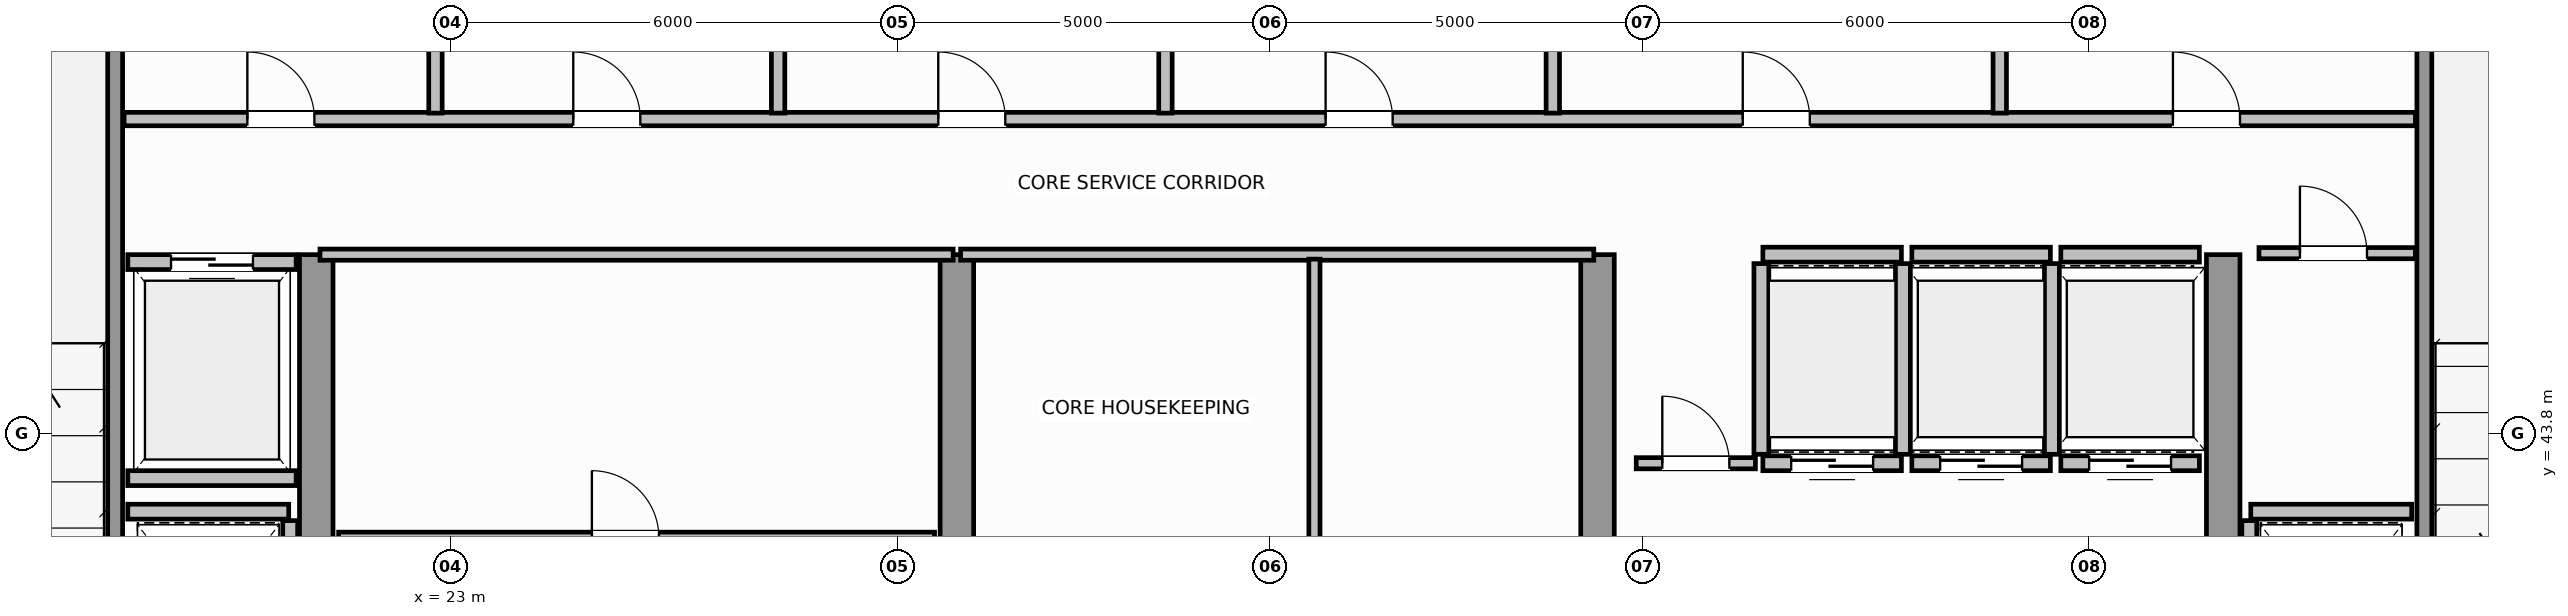
"""IFC4 building model, lengths in metres.
Left out: names, types, materials, properties, quantities, classifications, styles, units other than length and angle.
Written with IfcOpenShell. Run it as: python <this file> out.ifc"""

import sys

from ifc_helpers import new_model, si_unit, direction, frame, frame_2d, origin, place, context, subcontext, project, spatial, rectangle, extrude, source, transform, mapped, element, fill, save


model = new_model("IFC4")
c1 = context("Model", 3, precision=1e-05, world=origin(), true_north=direction((0.0, 1.0)))
c2 = subcontext(c1, "Body", "Model", "MODEL_VIEW")
j1 = project(units=[si_unit("LENGTHUNIT", "METRE"), si_unit("PLANEANGLEUNIT", "RADIAN")], contexts=[c1])
p1 = place(None, origin())
s1 = spatial("IfcSite", under=j1, at=p1, CompositionType="ELEMENT")
p2 = place(p1, origin())
s2 = spatial("IfcBuilding", under=s1, at=p2, CompositionType="ELEMENT")
p3 = place(p2, frame((0.0, 0.0, 280.2)))
s3 = spatial("IfcBuildingStorey", under=s2, at=p3, CompositionType="ELEMENT", Elevation=280.2)
for number, where, z_axis, x_axis in (
    (1, (21.2, 36.745, 0.0), (0.0, 0.0, 1.0), (0.0, 1.0, 0.0)),
    (2, (29.8, 36.745, 0.0), (0.0, 0.0, 1.0), (0.0, 1.0, 0.0)),
    (3, (38.4, 36.745, 0.0), (0.0, 0.0, 1.0), (0.0, 1.0, 0.0)),
    (4, (46.8, 36.745, 0.0), (0.0, 0.0, 1.0), (0.0, 1.0, 0.0)),
):
    element("IfcWall", number, at=place(p3, frame(where, z_axis=z_axis, x_axis=x_axis)), inside=s3, PredefinedType="SHEAR", context=c2, shape_type="SweptSolid", body=[
        extrude(rectangle(XDim=9.455, YDim=0.45, at=frame_2d((4.728, 0.0))), origin(), (0.0, 0.0, 1.0), 3.8),
    ])
for number, where, z_axis, x_axis in (
    (5, (18.5, 39.96, 0.0), (0.0, 0.0, 1.0), (0.0, 1.0, 0.0)),
    (6, (49.5, 39.96, 0.0), (0.0, 0.0, 1.0), (0.0, 1.0, 0.0)),
):
    element("IfcWall", number, at=place(p3, frame(where, z_axis=z_axis, x_axis=x_axis)), inside=s3, PredefinedType="SOLIDWALL", context=c2, shape_type="SweptSolid", body=[
        extrude(rectangle(XDim=9.93, YDim=0.2, at=frame_2d((4.965, 0.0))), origin(), (0.0, 0.0, 1.0), 3.8),
    ])
p4 = place(p3, frame((40.62, 43.4, 0.0), z_axis=(0.0, 0.0, 1.0), x_axis=(1.0, 0.0, 0.0)))
e7 = element("IfcWall", 7, at=p4, inside=s3, PredefinedType="SOLIDWALL", context=c2, shape_type="SweptSolid", body=[
    extrude(rectangle(XDim=1.86, YDim=0.2, at=frame_2d((0.93, 0.0))), origin(), (0.0, 0.0, 1.0), 3.58),
])
p5 = place(p4, frame((0.38, 0.0, 0.0)))
e8 = element("IfcOpeningElement", 8, at=p5, cuts=e7, PredefinedType="OPENING", context=c2, shape_type="SweptSolid", body=[
    extrude(rectangle(XDim=1.1, YDim=2.15, at=frame_2d((0.55, 1.075))), frame((0.0, 0.11, 0.0), z_axis=(0.0, -1.0, 0.0), x_axis=(1.0, 0.0, 0.0)), (0.0, 0.0, 1.0), 0.22),
])
p6 = place(p3, frame((40.62, 46.2, 0.0), z_axis=(0.0, 0.0, 1.0), x_axis=(1.0, 0.0, 0.0)))
e9 = element("IfcWall", 9, at=p6, inside=s3, PredefinedType="SOLIDWALL", context=c2, shape_type="SweptSolid", body=[
    extrude(rectangle(XDim=1.86, YDim=0.2, at=frame_2d((0.93, 0.0))), origin(), (0.0, 0.0, 1.0), 3.58),
])
for number, where, z_axis, x_axis in (
    (10, (40.6, 43.52, 0.0), (0.0, 0.0, 1.0), (0.0, 1.0, 0.0)),
    (11, (42.5, 43.52, 0.0), (0.0, 0.0, 1.0), (0.0, 1.0, 0.0)),
):
    element("IfcWall", number, at=place(p3, frame(where, z_axis=z_axis, x_axis=x_axis)), inside=s3, PredefinedType="SOLIDWALL", context=c2, shape_type="SweptSolid", body=[
        extrude(rectangle(XDim=2.56, YDim=0.2, at=frame_2d((1.28, 0.0))), origin(), (0.0, 0.0, 1.0), 3.58),
    ])
p7 = place(p3, frame((42.62, 43.4, 0.0), z_axis=(0.0, 0.0, 1.0), x_axis=(1.0, 0.0, 0.0)))
e12 = element("IfcWall", 12, at=p7, inside=s3, PredefinedType="SOLIDWALL", context=c2, shape_type="SweptSolid", body=[
    extrude(rectangle(XDim=1.86, YDim=0.2, at=frame_2d((0.93, 0.0))), origin(), (0.0, 0.0, 1.0), 3.58),
])
p8 = place(p7, frame((0.38, 0.0, 0.0)))
e13 = element("IfcOpeningElement", 13, at=p8, cuts=e12, PredefinedType="OPENING", context=c2, shape_type="SweptSolid", body=[
    extrude(rectangle(XDim=1.1, YDim=2.15, at=frame_2d((0.55, 1.075))), frame((0.0, 0.11, 0.0), z_axis=(0.0, -1.0, 0.0), x_axis=(1.0, 0.0, 0.0)), (0.0, 0.0, 1.0), 0.22),
])
p9 = place(p3, frame((42.62, 46.2, 0.0), z_axis=(0.0, 0.0, 1.0), x_axis=(1.0, 0.0, 0.0)))
e14 = element("IfcWall", 14, at=p9, inside=s3, PredefinedType="SOLIDWALL", context=c2, shape_type="SweptSolid", body=[
    extrude(rectangle(XDim=1.86, YDim=0.2, at=frame_2d((0.93, 0.0))), origin(), (0.0, 0.0, 1.0), 3.58),
])
p10 = place(p3, frame((44.5, 43.52, 0.0), z_axis=(0.0, 0.0, 1.0), x_axis=(0.0, 1.0, 0.0)))
e15 = element("IfcWall", 15, at=p10, inside=s3, PredefinedType="SOLIDWALL", context=c2, shape_type="SweptSolid", body=[
    extrude(rectangle(XDim=2.56, YDim=0.2, at=frame_2d((1.28, 0.0))), origin(), (0.0, 0.0, 1.0), 3.58),
])
p11 = place(p3, frame((44.62, 43.4, 0.0), z_axis=(0.0, 0.0, 1.0), x_axis=(1.0, 0.0, 0.0)))
e16 = element("IfcWall", 16, at=p11, inside=s3, PredefinedType="SOLIDWALL", context=c2, shape_type="SweptSolid", body=[
    extrude(rectangle(XDim=1.86, YDim=0.2, at=frame_2d((0.93, 0.0))), origin(), (0.0, 0.0, 1.0), 3.58),
])
p12 = place(p11, frame((0.38, 0.0, 0.0)))
e17 = element("IfcOpeningElement", 17, at=p12, cuts=e16, PredefinedType="OPENING", context=c2, shape_type="SweptSolid", body=[
    extrude(rectangle(XDim=1.1, YDim=2.15, at=frame_2d((0.55, 1.075))), frame((0.0, 0.11, 0.0), z_axis=(0.0, -1.0, 0.0), x_axis=(1.0, 0.0, 0.0)), (0.0, 0.0, 1.0), 0.22),
])
p13 = place(p3, frame((44.62, 46.2, 0.0), z_axis=(0.0, 0.0, 1.0), x_axis=(1.0, 0.0, 0.0)))
e18 = element("IfcWall", 18, at=p13, inside=s3, PredefinedType="SOLIDWALL", context=c2, shape_type="SweptSolid", body=[
    extrude(rectangle(XDim=1.86, YDim=0.2, at=frame_2d((0.93, 0.0))), origin(), (0.0, 0.0, 1.0), 3.58),
])
p14 = place(p3, frame((18.67, 46.1, 0.0), z_axis=(0.0, 0.0, 1.0), x_axis=(1.0, 0.0, 0.0)))
e19 = element("IfcWall", 19, at=p14, inside=s3, PredefinedType="SOLIDWALL", context=c2, shape_type="SweptSolid", body=[
    extrude(rectangle(XDim=2.26, YDim=0.2, at=frame_2d((1.13, 0.0))), origin(), (0.0, 0.0, 1.0), 3.58),
])
p15 = place(p14, frame((0.58, 0.0, 0.0)))
e20 = element("IfcOpeningElement", 20, at=p15, cuts=e19, PredefinedType="OPENING", context=c2, shape_type="SweptSolid", body=[
    extrude(rectangle(XDim=1.1, YDim=2.15, at=frame_2d((0.55, 1.075))), frame((0.0, 0.11, 0.0), z_axis=(0.0, -1.0, 0.0), x_axis=(1.0, 0.0, 0.0)), (0.0, 0.0, 1.0), 0.22),
])
p16 = place(p3, frame((18.67, 43.2, 0.0), z_axis=(0.0, 0.0, 1.0), x_axis=(1.0, 0.0, 0.0)))
e21 = element("IfcWall", 21, at=p16, inside=s3, PredefinedType="SOLIDWALL", context=c2, shape_type="SweptSolid", body=[
    extrude(rectangle(XDim=2.26, YDim=0.2, at=frame_2d((1.13, 0.0))), origin(), (0.0, 0.0, 1.0), 3.58),
])
p17 = place(p3, frame((18.67, 42.75, 0.0), z_axis=(0.0, 0.0, 1.0), x_axis=(1.0, 0.0, 0.0)))
e22 = element("IfcWall", 22, at=p17, inside=s3, PredefinedType="SOLIDWALL", context=c2, shape_type="SweptSolid", body=[
    extrude(rectangle(XDim=2.16, YDim=0.2, at=frame_2d((1.08, 0.0))), origin(), (0.0, 0.0, 1.0), 3.58),
])
p18 = place(p3, frame((20.85, 40.07, 0.0), z_axis=(0.0, 0.0, 1.0), x_axis=(0.0, 1.0, 0.0)))
e23 = element("IfcWall", 23, at=p18, inside=s3, PredefinedType="SOLIDWALL", context=c2, shape_type="SweptSolid", body=[
    extrude(rectangle(XDim=2.56, YDim=0.2, at=frame_2d((1.28, 0.0))), origin(), (0.0, 0.0, 1.0), 3.58),
])
p19 = place(p3, frame((47.17, 42.75, 0.0), z_axis=(0.0, 0.0, 1.0), x_axis=(1.0, 0.0, 0.0)))
e24 = element("IfcWall", 24, at=p19, inside=s3, PredefinedType="SOLIDWALL", context=c2, shape_type="SweptSolid", body=[
    extrude(rectangle(XDim=2.16, YDim=0.2, at=frame_2d((1.08, 0.0))), origin(), (0.0, 0.0, 1.0), 3.58),
])
p20 = place(p3, frame((47.15, 40.07, 0.0), z_axis=(0.0, 0.0, 1.0), x_axis=(0.0, 1.0, 0.0)))
e25 = element("IfcWall", 25, at=p20, inside=s3, PredefinedType="SOLIDWALL", context=c2, shape_type="SweptSolid", body=[
    extrude(rectangle(XDim=2.56, YDim=0.2, at=frame_2d((1.28, 0.0))), origin(), (0.0, 0.0, 1.0), 3.58),
])
p21 = place(p3, frame((21.25, 46.2, 0.0), z_axis=(0.0, 0.0, 1.0), x_axis=(1.0, 0.0, 0.0)))
e26 = element("IfcWall", 26, at=p21, inside=s3, PredefinedType="PARTITIONING", context=c2, shape_type="SweptSolid", body=[
    extrude(rectangle(XDim=8.5, YDim=0.15, at=frame_2d((4.25, 0.0))), origin(), (0.0, 0.0, 1.0), 3.58),
])
p22 = place(p3, frame((21.5, 42.4, 0.0), z_axis=(0.0, 0.0, 1.0), x_axis=(1.0, 0.0, 0.0)))
e27 = element("IfcWall", 27, at=p22, inside=s3, PredefinedType="PARTITIONING", context=c2, shape_type="SweptSolid", body=[
    extrude(rectangle(XDim=8.0, YDim=0.15, at=frame_2d((4.0, 0.0))), origin(), (0.0, 0.0, 1.0), 3.58),
])
p23 = place(p22, frame((3.4, 0.0, 0.0)))
e28 = element("IfcOpeningElement", 28, at=p23, cuts=e27, PredefinedType="OPENING", context=c2, shape_type="SweptSolid", body=[
    extrude(rectangle(XDim=0.9, YDim=2.1, at=frame_2d((0.45, 1.05))), frame((0.0, 0.085, 0.0), z_axis=(0.0, -1.0, 0.0), x_axis=(1.0, 0.0, 0.0)), (0.0, 0.0, 1.0), 0.17),
])
p24 = place(p3, frame((29.85, 46.2, 0.0), z_axis=(0.0, 0.0, 1.0), x_axis=(1.0, 0.0, 0.0)))
e29 = element("IfcWall", 29, at=p24, inside=s3, PredefinedType="PARTITIONING", context=c2, shape_type="SweptSolid", body=[
    extrude(rectangle(XDim=8.5, YDim=0.15, at=frame_2d((4.25, 0.0))), origin(), (0.0, 0.0, 1.0), 3.58),
])
p25 = place(p3, frame((34.6, 36.56, 0.0), z_axis=(0.0, 0.0, 1.0), x_axis=(0.0, 1.0, 0.0)))
e30 = element("IfcWall", 30, at=p25, inside=s3, PredefinedType="PARTITIONING", context=c2, shape_type="SweptSolid", body=[
    extrude(rectangle(XDim=9.58, YDim=0.15, at=frame_2d((4.79, 0.0))), origin(), (0.0, 0.0, 1.0), 3.58),
])
p26 = place(p25, frame((4.2, 0.0, 0.0)))
e31 = element("IfcOpeningElement", 31, at=p26, cuts=e30, PredefinedType="OPENING", context=c2, shape_type="SweptSolid", body=[
    extrude(rectangle(XDim=0.9, YDim=2.1, at=frame_2d((0.45, 1.05))), frame((0.0, 0.085, 0.0), z_axis=(0.0, -1.0, 0.0), x_axis=(1.0, 0.0, 0.0)), (0.0, 0.0, 1.0), 0.17),
])
p27 = place(p3, frame((47.28, 46.22, 0.0), z_axis=(0.0, 0.0, 1.0), x_axis=(1.0, 0.0, 0.0)))
e32 = element("IfcWall", 32, at=p27, inside=s3, PredefinedType="PARTITIONING", context=c2, shape_type="SweptSolid", body=[
    extrude(rectangle(XDim=2.1, YDim=0.15, at=frame_2d((1.05, 0.0))), origin(), (0.0, 0.0, 1.0), 3.58),
])
p28 = place(p27, frame((0.55, 0.0, 0.0)))
e33 = element("IfcOpeningElement", 33, at=p28, cuts=e32, PredefinedType="OPENING", context=c2, shape_type="SweptSolid", body=[
    extrude(rectangle(XDim=0.9, YDim=2.1, at=frame_2d((0.45, 1.05))), frame((0.0, 0.085, 0.0), z_axis=(0.0, -1.0, 0.0), x_axis=(1.0, 0.0, 0.0)), (0.0, 0.0, 1.0), 0.17),
])
p29 = place(p3, frame((38.92, 43.4, 0.0), z_axis=(0.0, 0.0, 1.0), x_axis=(1.0, 0.0, 0.0)))
e34 = element("IfcWall", 34, at=p29, inside=s3, PredefinedType="PARTITIONING", context=c2, shape_type="SweptSolid", body=[
    extrude(rectangle(XDim=1.6, YDim=0.15, at=frame_2d((0.8, 0.0))), origin(), (0.0, 0.0, 1.0), 3.58),
])
p30 = place(p29, frame((0.35, 0.0, 0.0)))
e35 = element("IfcOpeningElement", 35, at=p30, cuts=e34, PredefinedType="OPENING", context=c2, shape_type="SweptSolid", body=[
    extrude(rectangle(XDim=0.9, YDim=2.1, at=frame_2d((0.45, 1.05))), frame((0.0, 0.085, 0.0), z_axis=(0.0, -1.0, 0.0), x_axis=(1.0, 0.0, 0.0)), (0.0, 0.0, 1.0), 0.17),
])
p31 = place(p3, frame((18.62, 48.02, 0.0), z_axis=(0.0, 0.0, 1.0), x_axis=(1.0, 0.0, 0.0)))
e36 = element("IfcWall", 36, at=p31, inside=s3, PredefinedType="PLUMBINGWALL", context=c2, shape_type="SweptSolid", body=[
    extrude(rectangle(XDim=30.76, YDim=0.18, at=frame_2d((15.38, 0.0))), origin(), (0.0, 0.0, 1.0), 3.58),
])
p32 = place(p31, frame((1.655, 0.0, 0.0)))
e37 = element("IfcOpeningElement", 37, at=p32, cuts=e36, PredefinedType="OPENING", context=c2, shape_type="SweptSolid", body=[
    extrude(rectangle(XDim=0.9, YDim=2.15, at=frame_2d((0.45, 1.075))), frame((0.0, 0.1, 0.0), z_axis=(0.0, -1.0, 0.0), x_axis=(1.0, 0.0, 0.0)), (0.0, 0.0, 1.0), 0.2),
])
p33 = place(p31, frame((6.03, 0.0, 0.0)))
e38 = element("IfcOpeningElement", 38, at=p33, cuts=e36, PredefinedType="OPENING", context=c2, shape_type="SweptSolid", body=[
    extrude(rectangle(XDim=0.9, YDim=2.15, at=frame_2d((0.45, 1.075))), frame((0.0, 0.1, 0.0), z_axis=(0.0, -1.0, 0.0), x_axis=(1.0, 0.0, 0.0)), (0.0, 0.0, 1.0), 0.2),
])
p34 = place(p31, frame((10.93, 0.0, 0.0)))
e39 = element("IfcOpeningElement", 39, at=p34, cuts=e36, PredefinedType="OPENING", context=c2, shape_type="SweptSolid", body=[
    extrude(rectangle(XDim=0.9, YDim=2.15, at=frame_2d((0.45, 1.075))), frame((0.0, 0.1, 0.0), z_axis=(0.0, -1.0, 0.0), x_axis=(1.0, 0.0, 0.0)), (0.0, 0.0, 1.0), 0.2),
])
p35 = place(p31, frame((16.13, 0.0, 0.0)))
e40 = element("IfcOpeningElement", 40, at=p35, cuts=e36, PredefinedType="OPENING", context=c2, shape_type="SweptSolid", body=[
    extrude(rectangle(XDim=0.9, YDim=2.15, at=frame_2d((0.45, 1.075))), frame((0.0, 0.1, 0.0), z_axis=(0.0, -1.0, 0.0), x_axis=(1.0, 0.0, 0.0)), (0.0, 0.0, 1.0), 0.2),
])
p36 = place(p31, frame((21.73, 0.0, 0.0)))
e41 = element("IfcOpeningElement", 41, at=p36, cuts=e36, PredefinedType="OPENING", context=c2, shape_type="SweptSolid", body=[
    extrude(rectangle(XDim=0.9, YDim=2.15, at=frame_2d((0.45, 1.075))), frame((0.0, 0.1, 0.0), z_axis=(0.0, -1.0, 0.0), x_axis=(1.0, 0.0, 0.0)), (0.0, 0.0, 1.0), 0.2),
])
p37 = place(p31, frame((27.505, 0.0, 0.0)))
e42 = element("IfcOpeningElement", 42, at=p37, cuts=e36, PredefinedType="OPENING", context=c2, shape_type="SweptSolid", body=[
    extrude(rectangle(XDim=0.9, YDim=2.15, at=frame_2d((0.45, 1.075))), frame((0.0, 0.1, 0.0), z_axis=(0.0, -1.0, 0.0), x_axis=(1.0, 0.0, 0.0)), (0.0, 0.0, 1.0), 0.2),
])
p38 = place(p3, frame((22.8, 48.1, 0.0), z_axis=(0.0, 0.0, 1.0), x_axis=(0.0, 1.0, 0.0)))
e43 = element("IfcWall", 43, at=p38, inside=s3, PredefinedType="PLUMBINGWALL", context=c2, shape_type="SweptSolid", body=[
    extrude(rectangle(XDim=2.43, YDim=0.18, at=frame_2d((1.215, 0.0))), origin(), (0.0, 0.0, 1.0), 3.12),
])
for number, where, z_axis, x_axis in (
    (44, (27.4, 48.1, 0.0), (0.0, 0.0, 1.0), (0.0, 1.0, 0.0)),
    (45, (32.6, 48.1, 0.0), (0.0, 0.0, 1.0), (0.0, 1.0, 0.0)),
    (46, (37.8, 48.1, 0.0), (0.0, 0.0, 1.0), (0.0, 1.0, 0.0)),
    (47, (43.8, 48.1, 0.0), (0.0, 0.0, 1.0), (0.0, 1.0, 0.0)),
):
    element("IfcWall", number, at=place(p3, frame(where, z_axis=z_axis, x_axis=x_axis)), inside=s3, PredefinedType="PLUMBINGWALL", context=c2, shape_type="SweptSolid", body=[
        extrude(rectangle(XDim=2.43, YDim=0.18, at=frame_2d((1.215, 0.0))), origin(), (0.0, 0.0, 1.0), 3.58),
    ])
m1 = source(origin(), c2, "Body", "SweptSolid", [
    extrude(rectangle(XDim=1.1, YDim=2.15, at=frame_2d((0.55, 1.075))), frame((0.0, 0.025, 0.0), z_axis=(0.0, -1.0, 0.0), x_axis=(1.0, 0.0, 0.0)), (0.0, 0.0, 1.0), 0.05),
])
p39 = place(p5, origin())
e48 = element("IfcDoor", 48, at=p39, inside=s3, OperationType="DOUBLE_DOOR_SLIDING", PredefinedType="DOOR", context=c2, shape_type="MappedRepresentation", body=[
    mapped(m1, transform((0.0, 0.0, 0.0), scale=1.0)),
])
fill(e8, e48)
p40 = place(p8, origin())
e49 = element("IfcDoor", 49, at=p40, inside=s3, OperationType="DOUBLE_DOOR_SLIDING", PredefinedType="DOOR", context=c2, shape_type="MappedRepresentation", body=[
    mapped(m1, transform((0.0, 0.0, 0.0), scale=1.0)),
])
fill(e13, e49)
p41 = place(p12, origin())
e50 = element("IfcDoor", 50, at=p41, inside=s3, OperationType="DOUBLE_DOOR_SLIDING", PredefinedType="DOOR", context=c2, shape_type="MappedRepresentation", body=[
    mapped(m1, transform((0.0, 0.0, 0.0), scale=1.0)),
])
fill(e17, e50)
p42 = place(p15, origin())
e51 = element("IfcDoor", 51, at=p42, inside=s3, OperationType="DOUBLE_DOOR_SLIDING", PredefinedType="DOOR", context=c2, shape_type="MappedRepresentation", body=[
    mapped(m1, transform((0.0, 0.0, 0.0), scale=1.0)),
])
fill(e20, e51)
m2 = source(origin(), c2, "Body", "SweptSolid", [
    extrude(rectangle(XDim=0.9, YDim=2.1, at=frame_2d((0.45, 1.05))), frame((0.0, 0.025, 0.0), z_axis=(0.0, -1.0, 0.0), x_axis=(1.0, 0.0, 0.0)), (0.0, 0.0, 1.0), 0.05),
])
p43 = place(p23, origin())
e52 = element("IfcDoor", 52, at=p43, inside=s3, OperationType="SINGLE_SWING_RIGHT", PredefinedType="DOOR", context=c2, shape_type="MappedRepresentation", body=[
    mapped(m2, transform((0.0, 0.0, 0.0), scale=1.0)),
])
fill(e28, e52)
p44 = place(p28, origin())
e53 = element("IfcDoor", 53, at=p44, inside=s3, OperationType="SINGLE_SWING_RIGHT", PredefinedType="DOOR", context=c2, shape_type="MappedRepresentation", body=[
    mapped(m2, transform((0.0, 0.0, 0.0), scale=1.0)),
])
fill(e33, e53)
p45 = place(p30, origin())
e54 = element("IfcDoor", 54, at=p45, inside=s3, OperationType="SINGLE_SWING_LEFT", PredefinedType="DOOR", context=c2, shape_type="MappedRepresentation", body=[
    mapped(m2, transform((0.0, 0.0, 0.0), scale=1.0)),
])
fill(e35, e54)
m3 = source(origin(), c2, "Body", "SweptSolid", [
    extrude(rectangle(XDim=0.9, YDim=2.15, at=frame_2d((0.45, 1.075))), frame((0.0, 0.025, 0.0), z_axis=(0.0, -1.0, 0.0), x_axis=(1.0, 0.0, 0.0)), (0.0, 0.0, 1.0), 0.05),
])
p46 = place(p32, origin())
e55 = element("IfcDoor", 55, at=p46, inside=s3, OperationType="SINGLE_SWING_LEFT", PredefinedType="DOOR", context=c2, shape_type="MappedRepresentation", body=[
    mapped(m3, transform((0.0, 0.0, 0.0), scale=1.0)),
])
fill(e37, e55)
p47 = place(p33, origin())
e56 = element("IfcDoor", 56, at=p47, inside=s3, OperationType="SINGLE_SWING_RIGHT", PredefinedType="DOOR", context=c2, shape_type="MappedRepresentation", body=[
    mapped(m3, transform((0.0, 0.0, 0.0), scale=1.0)),
])
fill(e38, e56)
p48 = place(p34, origin())
e57 = element("IfcDoor", 57, at=p48, inside=s3, OperationType="SINGLE_SWING_LEFT", PredefinedType="DOOR", context=c2, shape_type="MappedRepresentation", body=[
    mapped(m3, transform((0.0, 0.0, 0.0), scale=1.0)),
])
fill(e39, e57)
p49 = place(p35, origin())
e58 = element("IfcDoor", 58, at=p49, inside=s3, OperationType="SINGLE_SWING_RIGHT", PredefinedType="DOOR", context=c2, shape_type="MappedRepresentation", body=[
    mapped(m3, transform((0.0, 0.0, 0.0), scale=1.0)),
])
fill(e40, e58)
p50 = place(p36, origin())
e59 = element("IfcDoor", 59, at=p50, inside=s3, OperationType="SINGLE_SWING_LEFT", PredefinedType="DOOR", context=c2, shape_type="MappedRepresentation", body=[
    mapped(m3, transform((0.0, 0.0, 0.0), scale=1.0)),
])
fill(e41, e59)
p51 = place(p37, origin())
e60 = element("IfcDoor", 60, at=p51, inside=s3, OperationType="SINGLE_SWING_RIGHT", PredefinedType="DOOR", context=c2, shape_type="MappedRepresentation", body=[
    mapped(m3, transform((0.0, 0.0, 0.0), scale=1.0)),
])
fill(e42, e60)
save(model, sys.argv[1])
